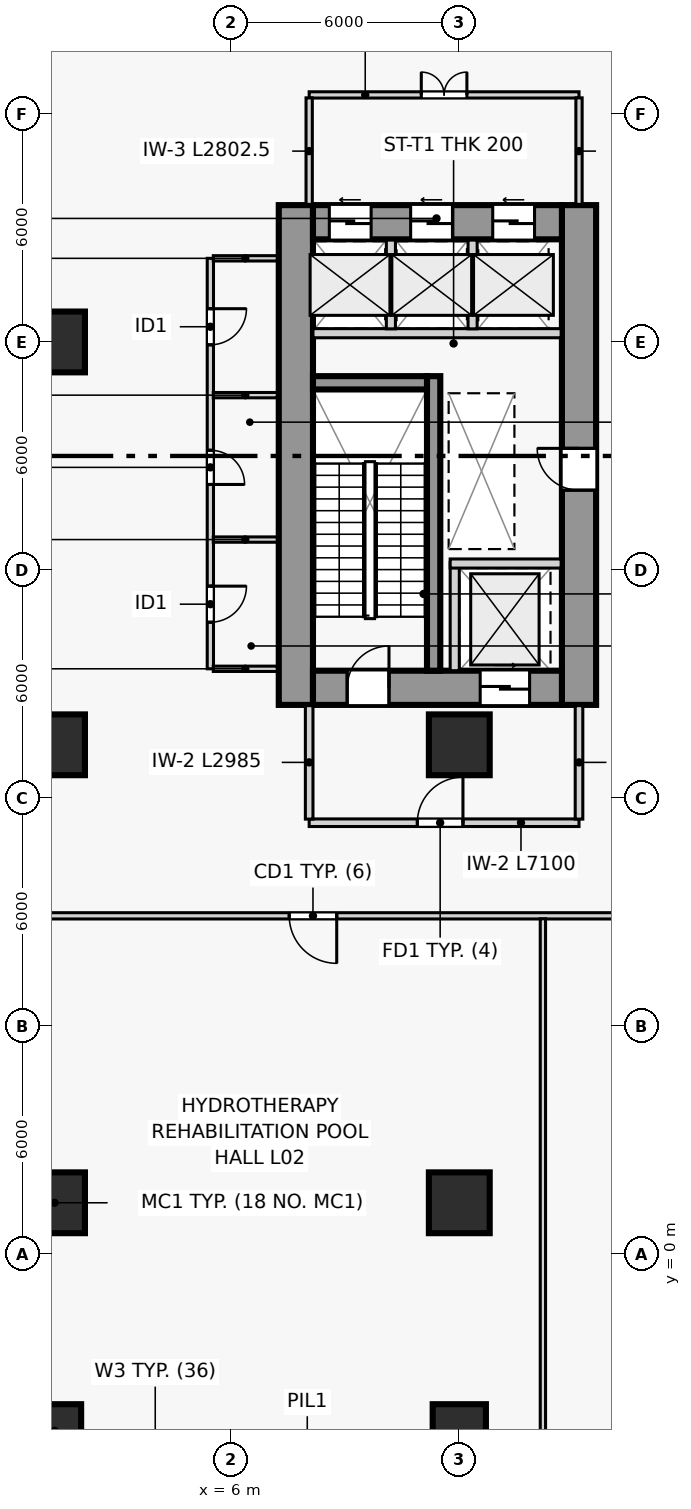
"""IFC4 building model, lengths in metres.
Left out: names, types, materials, properties, quantities, classifications, styles, units other than length and angle.
Written with IfcOpenShell. Run it as: python <this file> out.ifc"""

import sys

from ifc_helpers import new_model, si_unit, direction, frame, frame_2d, origin, origin_2d, place, context, subcontext, project, spatial, rectangle, extrude, source, transform, mapped, element, fill, save


model = new_model("IFC4")
c1 = context("Model", 3, precision=1e-05, world=origin(), true_north=direction((0.0, 1.0)))
c2 = subcontext(c1, "Body", "Model", "MODEL_VIEW")
j1 = project(units=[si_unit("LENGTHUNIT", "METRE"), si_unit("PLANEANGLEUNIT", "RADIAN")], contexts=[c1])
p1 = place(None, origin())
s1 = spatial("IfcSite", under=j1, at=p1, CompositionType="ELEMENT")
p2 = place(p1, origin())
s2 = spatial("IfcBuilding", under=s1, at=p2, CompositionType="ELEMENT")
p3 = place(p2, frame((0.0, 0.0, 9.0)))
s3 = spatial("IfcBuildingStorey", under=s2, at=p3, CompositionType="ELEMENT", Elevation=9.0)
p4 = place(p3, frame((7.7, 14.45, 0.0), z_axis=(0.0, 0.0, 1.0), x_axis=(0.0, 1.0, 0.0)))
e1 = element("IfcWall", 1, at=p4, inside=s3, PredefinedType="SHEAR", context=c2, shape_type="SweptSolid", body=[
    extrude(rectangle(XDim=13.15, YDim=0.9, at=frame_2d((6.575, 0.0))), origin(), (0.0, 0.0, 1.0), 4.5),
])
p5 = place(p3, frame((15.15, 14.45, 0.0), z_axis=(0.0, 0.0, 1.0), x_axis=(0.0, 1.0, 0.0)))
e2 = element("IfcWall", 2, at=p5, inside=s3, PredefinedType="SHEAR", context=c2, shape_type="SweptSolid", body=[
    extrude(rectangle(XDim=13.15, YDim=0.9, at=frame_2d((6.575, 0.0))), origin(), (0.0, 0.0, 1.0), 4.5),
])
p6 = place(p5, frame((5.65, 0.0, 0.0)))
e3 = element("IfcOpeningElement", 3, at=p6, cuts=e2, PredefinedType="OPENING", context=c2, shape_type="SweptSolid", body=[
    extrude(rectangle(XDim=1.1, YDim=2.2, at=frame_2d((0.55, 1.1))), frame((0.0, 0.46, 0.0), z_axis=(0.0, -1.0, 0.0), x_axis=(1.0, 0.0, 0.0)), (0.0, 0.0, 1.0), 0.92),
])
p7 = place(p3, frame((8.15, 14.9, 0.0), z_axis=(0.0, 0.0, 1.0), x_axis=(1.0, 0.0, 0.0)))
e4 = element("IfcWall", 4, at=p7, inside=s3, PredefinedType="SHEAR", context=c2, shape_type="SweptSolid", body=[
    extrude(rectangle(XDim=6.55, YDim=0.9, at=frame_2d((3.275, 0.0))), origin(), (0.0, 0.0, 1.0), 4.5),
])
p8 = place(p7, frame((0.9, 0.0, 0.0)))
e5 = element("IfcOpeningElement", 5, at=p8, cuts=e4, PredefinedType="OPENING", context=c2, shape_type="SweptSolid", body=[
    extrude(rectangle(XDim=1.1, YDim=2.2, at=frame_2d((0.55, 1.1))), frame((0.0, 0.46, 0.0), z_axis=(0.0, -1.0, 0.0), x_axis=(1.0, 0.0, 0.0)), (0.0, 0.0, 1.0), 0.92),
])
p9 = place(p7, frame((4.4, 0.0, 0.0)))
e6 = element("IfcOpeningElement", 6, at=p9, cuts=e4, PredefinedType="OPENING", context=c2, shape_type="SweptSolid", body=[
    extrude(rectangle(XDim=1.3, YDim=2.2, at=frame_2d((0.65, 1.1))), frame((0.0, 0.46, 0.0), z_axis=(0.0, -1.0, 0.0), x_axis=(1.0, 0.0, 0.0)), (0.0, 0.0, 1.0), 0.92),
])
p10 = place(p3, frame((8.15, 27.15, 0.0), z_axis=(0.0, 0.0, 1.0), x_axis=(1.0, 0.0, 0.0)))
e7 = element("IfcWall", 7, at=p10, inside=s3, PredefinedType="SHEAR", context=c2, shape_type="SweptSolid", body=[
    extrude(rectangle(XDim=6.55, YDim=0.9, at=frame_2d((3.275, 0.0))), origin(), (0.0, 0.0, 1.0), 4.5),
])
p11 = place(p10, frame((0.43, 0.0, 0.0)))
e8 = element("IfcOpeningElement", 8, at=p11, cuts=e7, PredefinedType="OPENING", context=c2, shape_type="SweptSolid", body=[
    extrude(rectangle(XDim=1.1, YDim=2.2, at=frame_2d((0.55, 1.1))), frame((0.0, 0.46, 0.0), z_axis=(0.0, -1.0, 0.0), x_axis=(1.0, 0.0, 0.0)), (0.0, 0.0, 1.0), 0.92),
])
p12 = place(p10, frame((2.57, 0.0, 0.0)))
e9 = element("IfcOpeningElement", 9, at=p12, cuts=e7, PredefinedType="OPENING", context=c2, shape_type="SweptSolid", body=[
    extrude(rectangle(XDim=1.1, YDim=2.2, at=frame_2d((0.55, 1.1))), frame((0.0, 0.46, 0.0), z_axis=(0.0, -1.0, 0.0), x_axis=(1.0, 0.0, 0.0)), (0.0, 0.0, 1.0), 0.92),
])
p13 = place(p10, frame((4.73, 0.0, 0.0)))
e10 = element("IfcOpeningElement", 10, at=p13, cuts=e7, PredefinedType="OPENING", context=c2, shape_type="SweptSolid", body=[
    extrude(rectangle(XDim=1.1, YDim=2.2, at=frame_2d((0.55, 1.1))), frame((0.0, 0.46, 0.0), z_axis=(0.0, -1.0, 0.0), x_axis=(1.0, 0.0, 0.0)), (0.0, 0.0, 1.0), 0.92),
])
p14 = place(p3, frame((11.325, 15.35, 0.0), z_axis=(0.0, 0.0, 1.0), x_axis=(0.0, 1.0, 0.0)))
e11 = element("IfcWall", 11, at=p14, inside=s3, PredefinedType="SHEAR", context=c2, shape_type="SweptSolid", body=[
    extrude(rectangle(XDim=7.75, YDim=0.35, at=frame_2d((3.875, 0.0))), origin(), (0.0, 0.0, 1.0), 4.5),
])
p15 = place(p3, frame((8.15, 22.925, 0.0), z_axis=(0.0, 0.0, 1.0), x_axis=(1.0, 0.0, 0.0)))
e12 = element("IfcWall", 12, at=p15, inside=s3, PredefinedType="SHEAR", context=c2, shape_type="SweptSolid", body=[
    extrude(rectangle(XDim=3.0, YDim=0.35, at=frame_2d((1.5, 0.0))), origin(), (0.0, 0.0, 1.0), 4.5),
])
m1 = source(origin(), c2, "Body", "SweptSolid", [
    extrude(rectangle(XDim=1.4, YDim=1.4, at=origin_2d()), origin(), (0.0, 0.0, 1.0), 4.5),
])
p16 = place(p3, frame((1.35, -4.65, 0.0), z_axis=(0.0, 0.0, 1.0), x_axis=(1.0, 0.0, 0.0)))
e13 = element("IfcColumn", 13, at=p16, inside=s3, PredefinedType="COLUMN", context=c2, shape_type="MappedRepresentation", body=[
    mapped(m1, transform((0.0, 0.0, 0.0), scale=1.0)),
])
m2 = source(origin(), c2, "Body", "SweptSolid", [
    extrude(rectangle(XDim=1.6, YDim=1.6, at=origin_2d()), origin(), (0.0, 0.0, 1.0), 4.5),
])
for number, where, z_axis, x_axis in (
    (14, (1.35, 1.35, 0.0), (0.0, 0.0, 1.0), (1.0, 0.0, 0.0)),
    (15, (1.35, 13.4, 0.0), (0.0, 0.0, 1.0), (1.0, 0.0, 0.0)),
    (16, (1.35, 24.0, 0.0), (0.0, 0.0, 1.0), (1.0, 0.0, 0.0)),
):
    element("IfcColumn", number, at=place(p3, frame(where, z_axis=z_axis, x_axis=x_axis)), inside=s3, PredefinedType="COLUMN", context=c2, shape_type="MappedRepresentation", body=[
        mapped(m2, transform((0.0, 0.0, 0.0), scale=1.0)),
    ])
p17 = place(p3, frame((12.0, -4.65, 0.0), z_axis=(0.0, 0.0, 1.0), x_axis=(1.0, 0.0, 0.0)))
e17 = element("IfcColumn", 17, at=p17, inside=s3, PredefinedType="COLUMN", context=c2, shape_type="MappedRepresentation", body=[
    mapped(m1, transform((0.0, 0.0, 0.0), scale=1.0)),
])
for number, where, z_axis, x_axis in (
    (18, (12.0, 1.35, 0.0), (0.0, 0.0, 1.0), (1.0, 0.0, 0.0)),
    (19, (12.0, 13.4, 0.0), (0.0, 0.0, 1.0), (1.0, 0.0, 0.0)),
):
    element("IfcColumn", number, at=place(p3, frame(where, z_axis=z_axis, x_axis=x_axis)), inside=s3, PredefinedType="COLUMN", context=c2, shape_type="MappedRepresentation", body=[
        mapped(m2, transform((0.0, 0.0, 0.0), scale=1.0)),
    ])
p18 = place(p3, frame((11.88, 15.35, 0.0), z_axis=(0.0, 0.0, 1.0), x_axis=(0.0, 1.0, 0.0)))
e20 = element("IfcWall", 20, at=p18, inside=s3, PredefinedType="PARTITIONING", context=c2, shape_type="SweptSolid", body=[
    extrude(rectangle(XDim=2.85, YDim=0.24, at=frame_2d((1.425, 0.0))), origin(), (0.0, 0.0, 1.0), 4.16),
])
p19 = place(p3, frame((11.76, 18.17, 0.0), z_axis=(0.0, 0.0, 1.0), x_axis=(1.0, 0.0, 0.0)))
e21 = element("IfcWall", 21, at=p19, inside=s3, PredefinedType="PARTITIONING", context=c2, shape_type="SweptSolid", body=[
    extrude(rectangle(XDim=2.92, YDim=0.24, at=frame_2d((1.46, 0.0))), origin(), (0.0, 0.0, 1.0), 4.16),
])
p20 = place(p3, frame((8.05, 11.35, 0.0), z_axis=(0.0, 0.0, 1.0), x_axis=(1.0, 0.0, 0.0)))
e22 = element("IfcWall", 22, at=p20, inside=s3, PredefinedType="PARTITIONING", context=c2, shape_type="SweptSolid", body=[
    extrude(rectangle(XDim=7.1, YDim=0.2, at=frame_2d((3.55, 0.0))), origin(), (0.0, 0.0, 1.0), 4.16),
])
p21 = place(p20, frame((2.846, 0.0, 0.0)))
e23 = element("IfcOpeningElement", 23, at=p21, cuts=e22, PredefinedType="OPENING", context=c2, shape_type="SweptSolid", body=[
    extrude(rectangle(XDim=1.2, YDim=2.2, at=frame_2d((0.6, 1.1))), frame((0.0, 0.11, 0.0), z_axis=(0.0, -1.0, 0.0), x_axis=(1.0, 0.0, 0.0)), (0.0, 0.0, 1.0), 0.22),
])
for number, where, z_axis, x_axis in (
    (24, (8.05, 11.445, 0.0), (0.0, 0.0, 1.0), (0.0, 1.0, 0.0)),
    (25, (15.15, 11.445, 0.0), (0.0, 0.0, 1.0), (0.0, 1.0, 0.0)),
):
    element("IfcWall", number, at=place(p3, frame(where, z_axis=z_axis, x_axis=x_axis)), inside=s3, PredefinedType="PARTITIONING", context=c2, shape_type="SweptSolid", body=[
        extrude(rectangle(XDim=2.985, YDim=0.2, at=frame_2d((1.492, 0.0))), origin(), (0.0, 0.0, 1.0), 4.16),
    ])
p22 = place(p3, frame((8.15, 24.23, 0.0), z_axis=(0.0, 0.0, 1.0), x_axis=(1.0, 0.0, 0.0)))
e26 = element("IfcWall", 26, at=p22, inside=s3, PredefinedType="PARTITIONING", context=c2, shape_type="SweptSolid", body=[
    extrude(rectangle(XDim=6.53, YDim=0.24, at=frame_2d((3.265, 0.0))), origin(), (0.0, 0.0, 1.0), 4.16),
])
for number, where, z_axis, x_axis in (
    (27, (10.2, 24.345, 0.0), (0.0, 0.0, 1.0), (0.0, 1.0, 0.0)),
    (28, (12.35, 24.345, 0.0), (0.0, 0.0, 1.0), (0.0, 1.0, 0.0)),
):
    element("IfcWall", number, at=place(p3, frame(where, z_axis=z_axis, x_axis=x_axis)), inside=s3, PredefinedType="PARTITIONING", context=c2, shape_type="SweptSolid", body=[
        extrude(rectangle(XDim=2.335, YDim=0.24, at=frame_2d((1.167, 0.0))), origin(), (0.0, 0.0, 1.0), 4.16),
    ])
p23 = place(p3, frame((8.05, 30.5, 0.0), z_axis=(0.0, 0.0, 1.0), x_axis=(1.0, 0.0, 0.0)))
e29 = element("IfcWall", 29, at=p23, inside=s3, PredefinedType="PARTITIONING", context=c2, shape_type="SweptSolid", body=[
    extrude(rectangle(XDim=7.1, YDim=0.165, at=frame_2d((3.55, 0.0))), origin(), (0.0, 0.0, 1.0), 4.16),
])
p24 = place(p23, frame((2.95, 0.0, 0.0)))
e30 = element("IfcOpeningElement", 30, at=p24, cuts=e29, PredefinedType="OPENING", context=c2, shape_type="SweptSolid", body=[
    extrude(rectangle(XDim=1.2, YDim=2.2, at=frame_2d((0.6, 1.1))), frame((0.0, 0.093, 0.0), z_axis=(0.0, -1.0, 0.0), x_axis=(1.0, 0.0, 0.0)), (0.0, 0.0, 1.0), 0.185),
])
for number, where, z_axis, x_axis in (
    (31, (8.05, 27.62, 0.0), (0.0, 0.0, 1.0), (0.0, 1.0, 0.0)),
    (32, (15.15, 27.62, 0.0), (0.0, 0.0, 1.0), (0.0, 1.0, 0.0)),
):
    element("IfcWall", number, at=place(p3, frame(where, z_axis=z_axis, x_axis=x_axis)), inside=s3, PredefinedType="PARTITIONING", context=c2, shape_type="SweptSolid", body=[
        extrude(rectangle(XDim=2.802, YDim=0.165, at=frame_2d((1.401, 0.0))), origin(), (0.0, 0.0, 1.0), 4.16),
    ])
p25 = place(p3, frame((5.45, 15.4, 0.0), z_axis=(0.0, 0.0, 1.0), x_axis=(0.0, 1.0, 0.0)))
e33 = element("IfcWall", 33, at=p25, inside=s3, PredefinedType="PARTITIONING", context=c2, shape_type="SweptSolid", body=[
    extrude(rectangle(XDim=10.8, YDim=0.165, at=frame_2d((5.4, 0.0))), origin(), (0.0, 0.0, 1.0), 4.16),
])
p26 = place(p25, frame((1.225, 0.0, 0.0)))
e34 = element("IfcOpeningElement", 34, at=p26, cuts=e33, PredefinedType="OPENING", context=c2, shape_type="SweptSolid", body=[
    extrude(rectangle(XDim=0.95, YDim=2.1, at=frame_2d((0.475, 1.05))), frame((0.0, 0.093, 0.0), z_axis=(0.0, -1.0, 0.0), x_axis=(1.0, 0.0, 0.0)), (0.0, 0.0, 1.0), 0.185),
])
p27 = place(p25, frame((4.85, 0.0, 0.0)))
e35 = element("IfcOpeningElement", 35, at=p27, cuts=e33, PredefinedType="OPENING", context=c2, shape_type="SweptSolid", body=[
    extrude(rectangle(XDim=0.9, YDim=2.1, at=frame_2d((0.45, 1.05))), frame((0.0, 0.093, 0.0), z_axis=(0.0, -1.0, 0.0), x_axis=(1.0, 0.0, 0.0)), (0.0, 0.0, 1.0), 0.185),
])
p28 = place(p25, frame((8.525, 0.0, 0.0)))
e36 = element("IfcOpeningElement", 36, at=p28, cuts=e33, PredefinedType="OPENING", context=c2, shape_type="SweptSolid", body=[
    extrude(rectangle(XDim=0.95, YDim=2.1, at=frame_2d((0.475, 1.05))), frame((0.0, 0.093, 0.0), z_axis=(0.0, -1.0, 0.0), x_axis=(1.0, 0.0, 0.0)), (0.0, 0.0, 1.0), 0.185),
])
for number, where, z_axis, x_axis in (
    (37, (5.528, 15.4, 0.0), (0.0, 0.0, 1.0), (1.0, 0.0, 0.0)),
    (38, (5.528, 26.2, 0.0), (0.0, 0.0, 1.0), (1.0, 0.0, 0.0)),
):
    element("IfcWall", number, at=place(p3, frame(where, z_axis=z_axis, x_axis=x_axis)), inside=s3, PredefinedType="PARTITIONING", context=c2, shape_type="SweptSolid", body=[
        extrude(rectangle(XDim=1.682, YDim=0.14, at=frame_2d((0.841, 0.0))), origin(), (0.0, 0.0, 1.0), 4.16),
    ])
p29 = place(p3, frame((5.528, 18.8, 0.0), z_axis=(0.0, 0.0, 1.0), x_axis=(1.0, 0.0, 0.0)))
e39 = element("IfcWall", 39, at=p29, inside=s3, PredefinedType="PLUMBINGWALL", context=c2, shape_type="SweptSolid", body=[
    extrude(rectangle(XDim=1.682, YDim=0.14, at=frame_2d((0.841, 0.0))), origin(), (0.0, 0.0, 1.0), 4.16),
])
p30 = place(p3, frame((5.528, 22.6, 0.0), z_axis=(0.0, 0.0, 1.0), x_axis=(1.0, 0.0, 0.0)))
e40 = element("IfcWall", 40, at=p30, inside=s3, PredefinedType="PARTITIONING", context=c2, shape_type="SweptSolid", body=[
    extrude(rectangle(XDim=1.682, YDim=0.14, at=frame_2d((0.841, 0.0))), origin(), (0.0, 0.0, 1.0), 4.16),
])
p31 = place(p3, frame((0.185, 8.9, 0.0), z_axis=(0.0, 0.0, 1.0), x_axis=(1.0, 0.0, 0.0)))
e41 = element("IfcWall", 41, at=p31, inside=s3, PredefinedType="PARTITIONING", context=c2, shape_type="SweptSolid", body=[
    extrude(rectangle(XDim=25.265, YDim=0.165, at=frame_2d((12.632, 0.0))), origin(), (0.0, 0.0, 1.0), 4.16),
])
p32 = place(p31, frame((7.34, 0.0, 0.0)))
e42 = element("IfcOpeningElement", 42, at=p32, cuts=e41, PredefinedType="OPENING", context=c2, shape_type="SweptSolid", body=[
    extrude(rectangle(XDim=1.25, YDim=2.2, at=frame_2d((0.625, 1.1))), frame((0.0, 0.093, 0.0), z_axis=(0.0, -1.0, 0.0), x_axis=(1.0, 0.0, 0.0)), (0.0, 0.0, 1.0), 0.185),
])
p33 = place(p31, frame((19.065, 0.0, 0.0)))
e43 = element("IfcOpeningElement", 43, at=p33, cuts=e41, PredefinedType="OPENING", context=c2, shape_type="SweptSolid", body=[
    extrude(rectangle(XDim=1.25, YDim=2.2, at=frame_2d((0.625, 1.1))), frame((0.0, 0.093, 0.0), z_axis=(0.0, -1.0, 0.0), x_axis=(1.0, 0.0, 0.0)), (0.0, 0.0, 1.0), 0.185),
])
p34 = place(p3, frame((14.2, -5.815, 0.0), z_axis=(0.0, 0.0, 1.0), x_axis=(0.0, 1.0, 0.0)))
e44 = element("IfcWall", 44, at=p34, inside=s3, PredefinedType="PARTITIONING", context=c2, shape_type="SweptSolid", body=[
    extrude(rectangle(XDim=14.637, YDim=0.14, at=frame_2d((7.319, 0.0))), origin(), (0.0, 0.0, 1.0), 4.16),
])
m3 = source(origin(), c2, "Body", "SweptSolid", [
    extrude(rectangle(XDim=1.1, YDim=2.2, at=frame_2d((0.55, 1.1))), frame((0.0, 0.025, 0.0), z_axis=(0.0, -1.0, 0.0), x_axis=(1.0, 0.0, 0.0)), (0.0, 0.0, 1.0), 0.05),
])
p35 = place(p8, origin())
e45 = element("IfcDoor", 45, at=p35, inside=s3, OperationType="SINGLE_SWING_RIGHT", PredefinedType="DOOR", context=c2, shape_type="MappedRepresentation", body=[
    mapped(m3, transform((0.0, 0.0, 0.0), scale=1.0)),
])
fill(e5, e45)
m4 = source(origin(), c2, "Body", "SweptSolid", [
    extrude(rectangle(XDim=1.3, YDim=2.2, at=frame_2d((0.65, 1.1))), frame((0.0, 0.025, 0.0), z_axis=(0.0, -1.0, 0.0), x_axis=(1.0, 0.0, 0.0)), (0.0, 0.0, 1.0), 0.05),
])
p36 = place(p9, origin())
e46 = element("IfcDoor", 46, at=p36, inside=s3, OperationType="SLIDING_TO_RIGHT", PredefinedType="DOOR", context=c2, shape_type="MappedRepresentation", body=[
    mapped(m4, transform((0.0, 0.0, 0.0), scale=1.0)),
])
fill(e6, e46)
m5 = source(origin(), c2, "Body", "SweptSolid", [
    extrude(rectangle(XDim=1.2, YDim=2.2, at=frame_2d((0.6, 1.1))), frame((0.0, 0.025, 0.0), z_axis=(0.0, -1.0, 0.0), x_axis=(1.0, 0.0, 0.0)), (0.0, 0.0, 1.0), 0.05),
])
p37 = place(p21, origin())
e47 = element("IfcDoor", 47, at=p37, inside=s3, OperationType="SINGLE_SWING_RIGHT", PredefinedType="DOOR", context=c2, shape_type="MappedRepresentation", body=[
    mapped(m5, transform((0.0, 0.0, 0.0), scale=1.0)),
])
fill(e23, e47)
m6 = source(origin(), c2, "Body", "SweptSolid", [
    extrude(rectangle(XDim=1.1, YDim=2.2, at=frame_2d((0.55, 1.1))), frame((0.0, 0.025, 0.0), z_axis=(0.0, -1.0, 0.0), x_axis=(1.0, 0.0, 0.0)), (0.0, 0.0, 1.0), 0.05),
])
p38 = place(p11, origin())
e48 = element("IfcDoor", 48, at=p38, inside=s3, OperationType="SLIDING_TO_LEFT", PredefinedType="DOOR", context=c2, shape_type="MappedRepresentation", body=[
    mapped(m6, transform((0.0, 0.0, 0.0), scale=1.0)),
])
fill(e8, e48)
p39 = place(p12, origin())
e49 = element("IfcDoor", 49, at=p39, inside=s3, OperationType="SLIDING_TO_LEFT", PredefinedType="DOOR", context=c2, shape_type="MappedRepresentation", body=[
    mapped(m6, transform((0.0, 0.0, 0.0), scale=1.0)),
])
fill(e9, e49)
p40 = place(p13, origin())
e50 = element("IfcDoor", 50, at=p40, inside=s3, OperationType="SLIDING_TO_LEFT", PredefinedType="DOOR", context=c2, shape_type="MappedRepresentation", body=[
    mapped(m6, transform((0.0, 0.0, 0.0), scale=1.0)),
])
fill(e10, e50)
p41 = place(p24, origin())
e51 = element("IfcDoor", 51, at=p41, inside=s3, OperationType="DOUBLE_DOOR_SINGLE_SWING", PredefinedType="DOOR", context=c2, shape_type="MappedRepresentation", body=[
    mapped(m5, transform((0.0, 0.0, 0.0), scale=1.0)),
])
fill(e30, e51)
p42 = place(p6, origin())
e52 = element("IfcDoor", 52, at=p42, inside=s3, OperationType="SINGLE_SWING_RIGHT", PredefinedType="DOOR", context=c2, shape_type="MappedRepresentation", body=[
    mapped(m3, transform((0.0, 0.0, 0.0), scale=1.0)),
])
fill(e3, e52)
m7 = source(origin(), c2, "Body", "SweptSolid", [
    extrude(rectangle(XDim=0.95, YDim=2.1, at=frame_2d((0.475, 1.05))), frame((0.0, 0.025, 0.0), z_axis=(0.0, -1.0, 0.0), x_axis=(1.0, 0.0, 0.0)), (0.0, 0.0, 1.0), 0.05),
])
p43 = place(p26, frame((0.95, 0.0, 0.0), z_axis=(0.0, 0.0, 1.0), x_axis=(-1.0, 0.0, 0.0)))
e53 = element("IfcDoor", 53, at=p43, inside=s3, OperationType="SINGLE_SWING_LEFT", PredefinedType="DOOR", context=c2, shape_type="MappedRepresentation", body=[
    mapped(m7, transform((0.0, 0.0, 0.0), scale=1.0)),
])
fill(e34, e53)
m8 = source(origin(), c2, "Body", "SweptSolid", [
    extrude(rectangle(XDim=0.9, YDim=2.1, at=frame_2d((0.45, 1.05))), frame((0.0, 0.025, 0.0), z_axis=(0.0, -1.0, 0.0), x_axis=(1.0, 0.0, 0.0)), (0.0, 0.0, 1.0), 0.05),
])
p44 = place(p27, frame((0.9, 0.0, 0.0), z_axis=(0.0, 0.0, 1.0), x_axis=(-1.0, 0.0, 0.0)))
e54 = element("IfcDoor", 54, at=p44, inside=s3, OperationType="SINGLE_SWING_RIGHT", PredefinedType="DOOR", context=c2, shape_type="MappedRepresentation", body=[
    mapped(m8, transform((0.0, 0.0, 0.0), scale=1.0)),
])
fill(e35, e54)
p45 = place(p28, frame((0.95, 0.0, 0.0), z_axis=(0.0, 0.0, 1.0), x_axis=(-1.0, 0.0, 0.0)))
e55 = element("IfcDoor", 55, at=p45, inside=s3, OperationType="SINGLE_SWING_LEFT", PredefinedType="DOOR", context=c2, shape_type="MappedRepresentation", body=[
    mapped(m7, transform((0.0, 0.0, 0.0), scale=1.0)),
])
fill(e36, e55)
m9 = source(origin(), c2, "Body", "SweptSolid", [
    extrude(rectangle(XDim=1.25, YDim=2.2, at=frame_2d((0.625, 1.1))), frame((0.0, 0.025, 0.0), z_axis=(0.0, -1.0, 0.0), x_axis=(1.0, 0.0, 0.0)), (0.0, 0.0, 1.0), 0.05),
])
p46 = place(p32, frame((1.25, 0.0, 0.0), z_axis=(0.0, 0.0, 1.0), x_axis=(-1.0, 0.0, 0.0)))
e56 = element("IfcDoor", 56, at=p46, inside=s3, OperationType="SINGLE_SWING_LEFT", PredefinedType="DOOR", context=c2, shape_type="MappedRepresentation", body=[
    mapped(m9, transform((0.0, 0.0, 0.0), scale=1.0)),
])
fill(e42, e56)
save(model, sys.argv[1])
